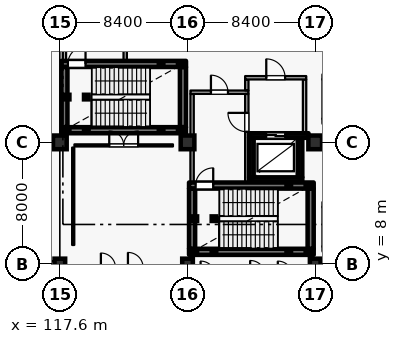
"""IFC4 building model, lengths in metres.
Left out: names, types, materials, properties, quantities, classifications, styles, units other than length and angle.
Written with IfcOpenShell. Run it as: python <this file> out.ifc"""

import sys

from ifc_helpers import new_model, si_unit, direction, frame, frame_2d, origin, origin_2d, place, context, subcontext, project, spatial, rectangle, hollow_rectangle, extrude, element, fill, save


model = new_model("IFC4")
c1 = context("Model", 3, precision=1e-05, world=origin(), true_north=direction((0.0, 1.0)))
c2 = subcontext(c1, "Body", "Model", "MODEL_VIEW")
j1 = project(units=[si_unit("LENGTHUNIT", "METRE"), si_unit("PLANEANGLEUNIT", "RADIAN")], contexts=[c1])
p1 = place(None, origin())
s1 = spatial("IfcSite", under=j1, at=p1, CompositionType="ELEMENT")
p2 = place(p1, origin())
s2 = spatial("IfcBuilding", under=s1, at=p2, CompositionType="ELEMENT")
p3 = place(p2, frame((0.0, 0.0, 16.2)))
s3 = spatial("IfcBuildingStorey", under=s2, at=p3, CompositionType="ELEMENT", Elevation=16.2)
for number, where, z_axis, x_axis in (
    (1, (117.6, 16.0, 0.0), (0.0, 0.0, 1.0), (1.0, 0.0, 0.0)),
    (2, (126.0, 16.0, 0.0), (0.0, 0.0, 1.0), (1.0, 0.0, 0.0)),
    (3, (134.4, 16.0, 0.0), (0.0, 0.0, 1.0), (1.0, 0.0, 0.0)),
):
    element("IfcColumn", number, at=place(p3, frame(where, z_axis=z_axis, x_axis=x_axis)), inside=s3, PredefinedType="COLUMN", context=c2, shape_type="SweptSolid", body=[
        extrude(rectangle(XDim=0.9, YDim=0.9, at=origin_2d()), origin(), (0.0, 0.0, 1.0), 4.8),
    ])
for number, where, z_axis, x_axis in (
    (4, (117.6, 8.0, 0.0), (0.0, 0.0, 1.0), (1.0, 0.0, 0.0)),
    (5, (126.0, 8.0, 0.0), (0.0, 0.0, 1.0), (1.0, 0.0, 0.0)),
    (6, (134.4, 8.0, 0.0), (0.0, 0.0, 1.0), (1.0, 0.0, 0.0)),
):
    element("IfcColumn", number, at=place(p3, frame(where, z_axis=z_axis, x_axis=x_axis)), inside=s3, PredefinedType="COLUMN", context=c2, shape_type="SweptSolid", body=[
        extrude(rectangle(XDim=0.7, YDim=0.7, at=origin_2d()), origin(), (0.0, 0.0, 1.0), 4.8),
    ])
p4 = place(p3, frame((117.25, 8.0, 0.0), z_axis=(0.0, 0.0, 1.0), x_axis=(-1.0, 0.0, 0.0)))
e7 = element("IfcWall", 7, at=p4, inside=s3, PredefinedType="SOLIDWALL", context=c2, shape_type="SweptSolid", body=[
    extrude(rectangle(XDim=7.75, YDim=0.38, at=frame_2d((3.875, 0.0))), origin(), (0.0, 0.0, 1.0), 3.84),
])
p5 = place(p4, frame((2.775, 0.0, 0.95)))
e8 = element("IfcOpeningElement", 8, at=p5, cuts=e7, PredefinedType="OPENING", context=c2, shape_type="SweptSolid", body=[
    extrude(rectangle(XDim=2.2, YDim=1.75, at=frame_2d((1.1, 0.875))), frame((0.0, 0.2, 0.0), z_axis=(0.0, -1.0, 0.0), x_axis=(1.0, 0.0, 0.0)), (0.0, 0.0, 1.0), 0.4),
])
p6 = place(p3, frame((130.05, 13.55, 0.0), z_axis=(0.0, 0.0, 1.0), x_axis=(1.0, 0.0, 0.0)))
e9 = element("IfcWall", 9, at=p6, inside=s3, PredefinedType="SHEAR", context=c2, shape_type="SweptSolid", body=[
    extrude(rectangle(XDim=3.5, YDim=0.3, at=frame_2d((1.75, 0.0))), origin(), (0.0, 0.0, 1.0), 4.535),
])
p7 = place(p3, frame((133.4, 13.705, 0.0), z_axis=(0.0, 0.0, 1.0), x_axis=(0.0, 1.0, 0.0)))
e10 = element("IfcWall", 10, at=p7, inside=s3, PredefinedType="SHEAR", context=c2, shape_type="SweptSolid", body=[
    extrude(rectangle(XDim=2.59, YDim=0.3, at=frame_2d((1.295, 0.0))), origin(), (0.0, 0.0, 1.0), 4.535),
])
p8 = place(p3, frame((133.96, 16.45, 0.0), z_axis=(0.0, 0.0, 1.0), x_axis=(-1.0, 0.0, 0.0)))
e11 = element("IfcWall", 11, at=p8, inside=s3, PredefinedType="SHEAR", context=c2, shape_type="SweptSolid", body=[
    extrude(rectangle(XDim=3.91, YDim=0.3, at=frame_2d((1.955, 0.0))), origin(), (0.0, 0.0, 1.0), 4.535),
])
p9 = place(p8, frame((1.535, 0.0, 0.0)))
e12 = element("IfcOpeningElement", 12, at=p9, cuts=e11, PredefinedType="OPENING", context=c2, shape_type="SweptSolid", body=[
    extrude(rectangle(XDim=1.25, YDim=2.25, at=frame_2d((0.625, 1.125))), frame((0.0, 0.16, 0.0), z_axis=(0.0, -1.0, 0.0), x_axis=(1.0, 0.0, 0.0)), (0.0, 0.0, 1.0), 0.32),
])
p10 = place(p3, frame((130.2, 16.295, 0.0), z_axis=(0.0, 0.0, 1.0), x_axis=(0.0, -1.0, 0.0)))
e13 = element("IfcWall", 13, at=p10, inside=s3, PredefinedType="SHEAR", context=c2, shape_type="SweptSolid", body=[
    extrude(rectangle(XDim=2.59, YDim=0.3, at=frame_2d((1.295, 0.0))), origin(), (0.0, 0.0, 1.0), 4.535),
])
p11 = place(p3, frame((126.1, 8.8, 0.0), z_axis=(0.0, 0.0, 1.0), x_axis=(1.0, 0.0, 0.0)))
e14 = element("IfcWall", 14, at=p11, inside=s3, PredefinedType="SHEAR", context=c2, shape_type="SweptSolid", body=[
    extrude(rectangle(XDim=8.2, YDim=0.4, at=frame_2d((4.1, 0.0))), origin(), (0.0, 0.0, 1.0), 4.535),
])
p12 = place(p3, frame((134.1, 9.005, 0.0), z_axis=(0.0, 0.0, 1.0), x_axis=(0.0, 1.0, 0.0)))
e15 = element("IfcWall", 15, at=p12, inside=s3, PredefinedType="SHEAR", context=c2, shape_type="SweptSolid", body=[
    extrude(rectangle(XDim=3.95, YDim=0.4, at=frame_2d((1.975, 0.0))), origin(), (0.0, 0.0, 1.0), 4.535),
])
p13 = place(p3, frame((126.1, 13.16, 0.0), z_axis=(0.0, 0.0, 1.0), x_axis=(1.0, 0.0, 0.0)))
e16 = element("IfcWall", 16, at=p13, inside=s3, PredefinedType="SHEAR", context=c2, shape_type="SweptSolid", body=[
    extrude(rectangle(XDim=8.2, YDim=0.4, at=frame_2d((4.1, 0.0))), origin(), (0.0, 0.0, 1.0), 4.535),
])
p14 = place(p13, frame((0.43, 0.0, 0.0)))
e17 = element("IfcOpeningElement", 17, at=p14, cuts=e16, PredefinedType="OPENING", context=c2, shape_type="SweptSolid", body=[
    extrude(rectangle(XDim=1.16, YDim=2.2, at=frame_2d((0.58, 1.1))), frame((0.0, 0.21, 0.0), z_axis=(0.0, -1.0, 0.0), x_axis=(1.0, 0.0, 0.0)), (0.0, 0.0, 1.0), 0.42),
])
p15 = place(p3, frame((126.3, 9.005, 0.0), z_axis=(0.0, 0.0, 1.0), x_axis=(0.0, 1.0, 0.0)))
e18 = element("IfcWall", 18, at=p15, inside=s3, PredefinedType="SHEAR", context=c2, shape_type="SweptSolid", body=[
    extrude(rectangle(XDim=3.95, YDim=0.4, at=frame_2d((1.975, 0.0))), origin(), (0.0, 0.0, 1.0), 4.535),
])
p16 = place(p3, frame((126.3, 13.365, 0.0), z_axis=(0.0, 0.0, 1.0), x_axis=(0.0, 1.0, 0.0)))
e19 = element("IfcWall", 19, at=p16, inside=s3, PredefinedType="PARTITIONING", context=c2, shape_type="SweptSolid", body=[
    extrude(rectangle(XDim=5.82, YDim=0.22, at=frame_2d((2.91, 0.0))), origin(), (0.0, 0.0, 1.0), 4.535),
])
p17 = place(p3, frame((126.19, 19.3, 0.0), z_axis=(0.0, 0.0, 1.0), x_axis=(1.0, 0.0, 0.0)))
e20 = element("IfcWall", 20, at=p17, inside=s3, PredefinedType="PARTITIONING", context=c2, shape_type="SweptSolid", body=[
    extrude(rectangle(XDim=3.82, YDim=0.22, at=frame_2d((1.91, 0.0))), origin(), (0.0, 0.0, 1.0), 4.535),
])
p18 = place(p17, frame((1.35, 0.0, 0.0)))
e21 = element("IfcOpeningElement", 21, at=p18, cuts=e20, PredefinedType="OPENING", context=c2, shape_type="SweptSolid", body=[
    extrude(rectangle(XDim=1.12, YDim=2.2, at=frame_2d((0.56, 1.1))), frame((0.0, 0.12, 0.0), z_axis=(0.0, -1.0, 0.0), x_axis=(1.0, 0.0, 0.0)), (0.0, 0.0, 1.0), 0.24),
])
p19 = place(p3, frame((129.9, 13.365, 0.0), z_axis=(0.0, 0.0, 1.0), x_axis=(0.0, 1.0, 0.0)))
e22 = element("IfcWall", 22, at=p19, inside=s3, PredefinedType="PARTITIONING", context=c2, shape_type="SweptSolid", body=[
    extrude(rectangle(XDim=5.82, YDim=0.22, at=frame_2d((2.91, 0.0))), origin(), (0.0, 0.0, 1.0), 4.535),
])
p20 = place(p19, frame((3.335, 0.0, 0.0)))
e23 = element("IfcOpeningElement", 23, at=p20, cuts=e22, PredefinedType="OPENING", context=c2, shape_type="SweptSolid", body=[
    extrude(rectangle(XDim=1.24, YDim=2.2, at=frame_2d((0.62, 1.1))), frame((0.0, 0.12, 0.0), z_axis=(0.0, -1.0, 0.0), x_axis=(1.0, 0.0, 0.0)), (0.0, 0.0, 1.0), 0.24),
])
p21 = place(p3, frame((129.9, 19.415, 0.0), z_axis=(0.0, 0.0, 1.0), x_axis=(0.0, 1.0, 0.0)))
e24 = element("IfcWall", 24, at=p21, inside=s3, PredefinedType="PARTITIONING", context=c2, shape_type="SweptSolid", body=[
    extrude(rectangle(XDim=0.72, YDim=0.22, at=frame_2d((0.36, 0.0))), origin(), (0.0, 0.0, 1.0), 4.535),
])
p22 = place(p3, frame((133.7, 16.605, 0.0), z_axis=(0.0, 0.0, 1.0), x_axis=(0.0, 1.0, 0.0)))
e25 = element("IfcWall", 25, at=p22, inside=s3, PredefinedType="PARTITIONING", context=c2, shape_type="SweptSolid", body=[
    extrude(rectangle(XDim=3.53, YDim=0.22, at=frame_2d((1.765, 0.0))), origin(), (0.0, 0.0, 1.0), 4.535),
])
p23 = place(p3, frame((129.79, 20.25, 0.0), z_axis=(0.0, 0.0, 1.0), x_axis=(1.0, 0.0, 0.0)))
e26 = element("IfcWall", 26, at=p23, inside=s3, PredefinedType="PARTITIONING", context=c2, shape_type="SweptSolid", body=[
    extrude(rectangle(XDim=4.02, YDim=0.22, at=frame_2d((2.01, 0.0))), origin(), (0.0, 0.0, 1.0), 4.535),
])
p24 = place(p23, frame((1.39, 0.0, 0.0)))
e27 = element("IfcOpeningElement", 27, at=p24, cuts=e26, PredefinedType="OPENING", context=c2, shape_type="SweptSolid", body=[
    extrude(rectangle(XDim=1.24, YDim=2.2, at=frame_2d((0.62, 1.1))), frame((0.0, 0.12, 0.0), z_axis=(0.0, -1.0, 0.0), x_axis=(1.0, 0.0, 0.0)), (0.0, 0.0, 1.0), 0.24),
])
for number, where, z_axis, x_axis in (
    (28, (126.48, 8.8, 0.0), (0.0, 0.0, 1.0), (1.0, 0.0, 0.0)),
    (29, (126.48, 10.98, 0.0), (0.0, 0.0, 1.0), (1.0, 0.0, 0.0)),
    (30, (127.74, 8.8, 0.0), (0.0, 0.0, 1.0), (1.0, 0.0, 0.0)),
    (31, (127.74, 10.98, 0.0), (0.0, 0.0, 1.0), (1.0, 0.0, 0.0)),
):
    element("IfcColumn", number, at=place(p3, frame(where, z_axis=z_axis, x_axis=x_axis)), inside=s3, PredefinedType="COLUMN", context=c2, shape_type="SweptSolid", body=[
        extrude(hollow_rectangle(XDim=0.3, YDim=0.3, WallThickness=0.012, at=origin_2d()), origin(), (0.0, 0.0, 1.0), 4.62),
    ])
for number, where, z_axis, x_axis in (
    (32, (132.66, 8.8, -2.4), (0.0, 0.0, 1.0), (1.0, 0.0, 0.0)),
    (33, (132.66, 13.16, -2.4), (0.0, 0.0, 1.0), (1.0, 0.0, 0.0)),
    (34, (133.92, 8.8, -2.4), (0.0, 0.0, 1.0), (1.0, 0.0, 0.0)),
    (35, (133.92, 13.16, -2.4), (0.0, 0.0, 1.0), (1.0, 0.0, 0.0)),
):
    element("IfcColumn", number, at=place(p3, frame(where, z_axis=z_axis, x_axis=x_axis)), inside=s3, PredefinedType="COLUMN", context=c2, shape_type="SweptSolid", body=[
        extrude(hollow_rectangle(XDim=0.3, YDim=0.3, WallThickness=0.012, at=origin_2d()), origin(), (0.0, 0.0, 1.0), 4.62),
    ])
p25 = place(p3, frame((117.7, 16.8, 0.0), z_axis=(0.0, 0.0, 1.0), x_axis=(1.0, 0.0, 0.0)))
e36 = element("IfcWall", 36, at=p25, inside=s3, PredefinedType="SHEAR", context=c2, shape_type="SweptSolid", body=[
    extrude(rectangle(XDim=8.2, YDim=0.4, at=frame_2d((4.1, 0.0))), origin(), (0.0, 0.0, 1.0), 4.535),
])
p26 = place(p3, frame((125.7, 17.005, 0.0), z_axis=(0.0, 0.0, 1.0), x_axis=(0.0, 1.0, 0.0)))
e37 = element("IfcWall", 37, at=p26, inside=s3, PredefinedType="SHEAR", context=c2, shape_type="SweptSolid", body=[
    extrude(rectangle(XDim=3.95, YDim=0.4, at=frame_2d((1.975, 0.0))), origin(), (0.0, 0.0, 1.0), 4.535),
])
p27 = place(p3, frame((117.7, 21.16, 0.0), z_axis=(0.0, 0.0, 1.0), x_axis=(1.0, 0.0, 0.0)))
e38 = element("IfcWall", 38, at=p27, inside=s3, PredefinedType="SHEAR", context=c2, shape_type="SweptSolid", body=[
    extrude(rectangle(XDim=8.2, YDim=0.4, at=frame_2d((4.1, 0.0))), origin(), (0.0, 0.0, 1.0), 4.535),
])
p28 = place(p27, frame((0.43, 0.0, 0.0)))
e39 = element("IfcOpeningElement", 39, at=p28, cuts=e38, PredefinedType="OPENING", context=c2, shape_type="SweptSolid", body=[
    extrude(rectangle(XDim=1.16, YDim=2.2, at=frame_2d((0.58, 1.1))), frame((0.0, 0.21, 0.0), z_axis=(0.0, -1.0, 0.0), x_axis=(1.0, 0.0, 0.0)), (0.0, 0.0, 1.0), 0.42),
])
p29 = place(p3, frame((117.9, 17.005, 0.0), z_axis=(0.0, 0.0, 1.0), x_axis=(0.0, 1.0, 0.0)))
e40 = element("IfcWall", 40, at=p29, inside=s3, PredefinedType="SHEAR", context=c2, shape_type="SweptSolid", body=[
    extrude(rectangle(XDim=3.95, YDim=0.4, at=frame_2d((1.975, 0.0))), origin(), (0.0, 0.0, 1.0), 4.535),
])
for number, where, z_axis, x_axis in (
    (41, (117.9, 21.365, 0.0), (0.0, 0.0, 1.0), (0.0, 1.0, 0.0)),
    (42, (121.9, 21.365, 0.0), (0.0, 0.0, 1.0), (0.0, 1.0, 0.0)),
):
    element("IfcWall", number, at=place(p3, frame(where, z_axis=z_axis, x_axis=x_axis)), inside=s3, PredefinedType="PARTITIONING", context=c2, shape_type="SweptSolid", body=[
        extrude(rectangle(XDim=1.87, YDim=0.22, at=frame_2d((0.935, 0.0))), origin(), (0.0, 0.0, 1.0), 4.535),
    ])
for number, where, z_axis, x_axis in (
    (43, (118.08, 16.8, 0.0), (0.0, 0.0, 1.0), (1.0, 0.0, 0.0)),
    (44, (118.08, 18.98, 0.0), (0.0, 0.0, 1.0), (1.0, 0.0, 0.0)),
    (45, (119.34, 16.8, 0.0), (0.0, 0.0, 1.0), (1.0, 0.0, 0.0)),
    (46, (119.34, 18.98, 0.0), (0.0, 0.0, 1.0), (1.0, 0.0, 0.0)),
):
    element("IfcColumn", number, at=place(p3, frame(where, z_axis=z_axis, x_axis=x_axis)), inside=s3, PredefinedType="COLUMN", context=c2, shape_type="SweptSolid", body=[
        extrude(hollow_rectangle(XDim=0.3, YDim=0.3, WallThickness=0.012, at=origin_2d()), origin(), (0.0, 0.0, 1.0), 4.62),
    ])
for number, where, z_axis, x_axis in (
    (47, (124.26, 16.8, -2.4), (0.0, 0.0, 1.0), (1.0, 0.0, 0.0)),
    (48, (124.26, 21.16, -2.4), (0.0, 0.0, 1.0), (1.0, 0.0, 0.0)),
    (49, (125.52, 16.8, -2.4), (0.0, 0.0, 1.0), (1.0, 0.0, 0.0)),
    (50, (125.52, 21.16, -2.4), (0.0, 0.0, 1.0), (1.0, 0.0, 0.0)),
):
    element("IfcColumn", number, at=place(p3, frame(where, z_axis=z_axis, x_axis=x_axis)), inside=s3, PredefinedType="COLUMN", context=c2, shape_type="SweptSolid", body=[
        extrude(hollow_rectangle(XDim=0.3, YDim=0.3, WallThickness=0.012, at=origin_2d()), origin(), (0.0, 0.0, 1.0), 4.62),
    ])
p30 = place(p3, frame((118.56, 15.8, 0.0), z_axis=(0.0, 0.0, 1.0), x_axis=(1.0, 0.0, 0.0)))
e51 = element("IfcWall", 51, at=p30, inside=s3, PredefinedType="PARTITIONING", context=c2, shape_type="SweptSolid", body=[
    extrude(rectangle(XDim=6.48, YDim=0.14, at=frame_2d((3.24, 0.0))), origin(), (0.0, 0.0, 1.0), 4.535),
])
p31 = place(p30, frame((2.29, 0.0, 0.0)))
e52 = element("IfcOpeningElement", 52, at=p31, cuts=e51, PredefinedType="OPENING", context=c2, shape_type="SweptSolid", body=[
    extrude(rectangle(XDim=1.9, YDim=2.4, at=frame_2d((0.95, 1.2))), frame((0.0, 0.08, 0.0), z_axis=(0.0, -1.0, 0.0), x_axis=(1.0, 0.0, 0.0)), (0.0, 0.0, 1.0), 0.16),
])
p32 = place(p3, frame((118.48, 9.25, 0.0), z_axis=(0.0, 0.0, 1.0), x_axis=(0.0, 1.0, 0.0)))
e53 = element("IfcWall", 53, at=p32, inside=s3, PredefinedType="PARTITIONING", context=c2, shape_type="SweptSolid", body=[
    extrude(rectangle(XDim=6.41, YDim=0.14, at=frame_2d((3.205, 0.0))), origin(), (0.0, 0.0, 1.0), 4.535),
])
p33 = place(p9, origin())
e54 = element("IfcDoor", 54, at=p33, inside=s3, OperationType="DOUBLE_DOOR_SLIDING", PredefinedType="DOOR", context=c2, shape_type="SweptSolid", body=[
    extrude(rectangle(XDim=1.25, YDim=2.25, at=frame_2d((0.625, 1.125))), frame((0.0, 0.025, 0.0), z_axis=(0.0, -1.0, 0.0), x_axis=(1.0, 0.0, 0.0)), (0.0, 0.0, 1.0), 0.05),
])
fill(e12, e54)
p34 = place(p14, origin())
e55 = element("IfcDoor", 55, at=p34, inside=s3, OperationType="SINGLE_SWING_RIGHT", PredefinedType="DOOR", context=c2, shape_type="SweptSolid", body=[
    extrude(rectangle(XDim=1.16, YDim=2.2, at=frame_2d((0.58, 1.1))), frame((0.0, 0.025, 0.0), z_axis=(0.0, -1.0, 0.0), x_axis=(1.0, 0.0, 0.0)), (0.0, 0.0, 1.0), 0.05),
])
fill(e17, e55)
p35 = place(p18, origin())
e56 = element("IfcDoor", 56, at=p35, inside=s3, OperationType="SINGLE_SWING_LEFT", PredefinedType="DOOR", context=c2, shape_type="SweptSolid", body=[
    extrude(rectangle(XDim=1.12, YDim=2.2, at=frame_2d((0.56, 1.1))), frame((0.0, 0.025, 0.0), z_axis=(0.0, -1.0, 0.0), x_axis=(1.0, 0.0, 0.0)), (0.0, 0.0, 1.0), 0.05),
])
fill(e21, e56)
p36 = place(p20, origin())
e57 = element("IfcDoor", 57, at=p36, inside=s3, OperationType="SINGLE_SWING_RIGHT", PredefinedType="DOOR", context=c2, shape_type="SweptSolid", body=[
    extrude(rectangle(XDim=1.24, YDim=2.2, at=frame_2d((0.62, 1.1))), frame((0.0, 0.025, 0.0), z_axis=(0.0, -1.0, 0.0), x_axis=(1.0, 0.0, 0.0)), (0.0, 0.0, 1.0), 0.05),
])
fill(e23, e57)
p37 = place(p24, origin())
e58 = element("IfcDoor", 58, at=p37, inside=s3, OperationType="SINGLE_SWING_LEFT", PredefinedType="DOOR", context=c2, shape_type="SweptSolid", body=[
    extrude(rectangle(XDim=1.24, YDim=2.2, at=frame_2d((0.62, 1.1))), frame((0.0, 0.025, 0.0), z_axis=(0.0, -1.0, 0.0), x_axis=(1.0, 0.0, 0.0)), (0.0, 0.0, 1.0), 0.05),
])
fill(e27, e58)
p38 = place(p28, origin())
e59 = element("IfcDoor", 59, at=p38, inside=s3, OperationType="SINGLE_SWING_RIGHT", PredefinedType="DOOR", context=c2, shape_type="SweptSolid", body=[
    extrude(rectangle(XDim=1.16, YDim=2.2, at=frame_2d((0.58, 1.1))), frame((0.0, 0.025, 0.0), z_axis=(0.0, -1.0, 0.0), x_axis=(1.0, 0.0, 0.0)), (0.0, 0.0, 1.0), 0.05),
])
fill(e39, e59)
p39 = place(p31, origin())
e60 = element("IfcDoor", 60, at=p39, inside=s3, OperationType="DOUBLE_DOOR_SINGLE_SWING", PredefinedType="DOOR", context=c2, shape_type="SweptSolid", body=[
    extrude(rectangle(XDim=1.9, YDim=2.4, at=frame_2d((0.95, 1.2))), frame((0.0, 0.025, 0.0), z_axis=(0.0, -1.0, 0.0), x_axis=(1.0, 0.0, 0.0)), (0.0, 0.0, 1.0), 0.05),
])
fill(e52, e60)
save(model, sys.argv[1])
